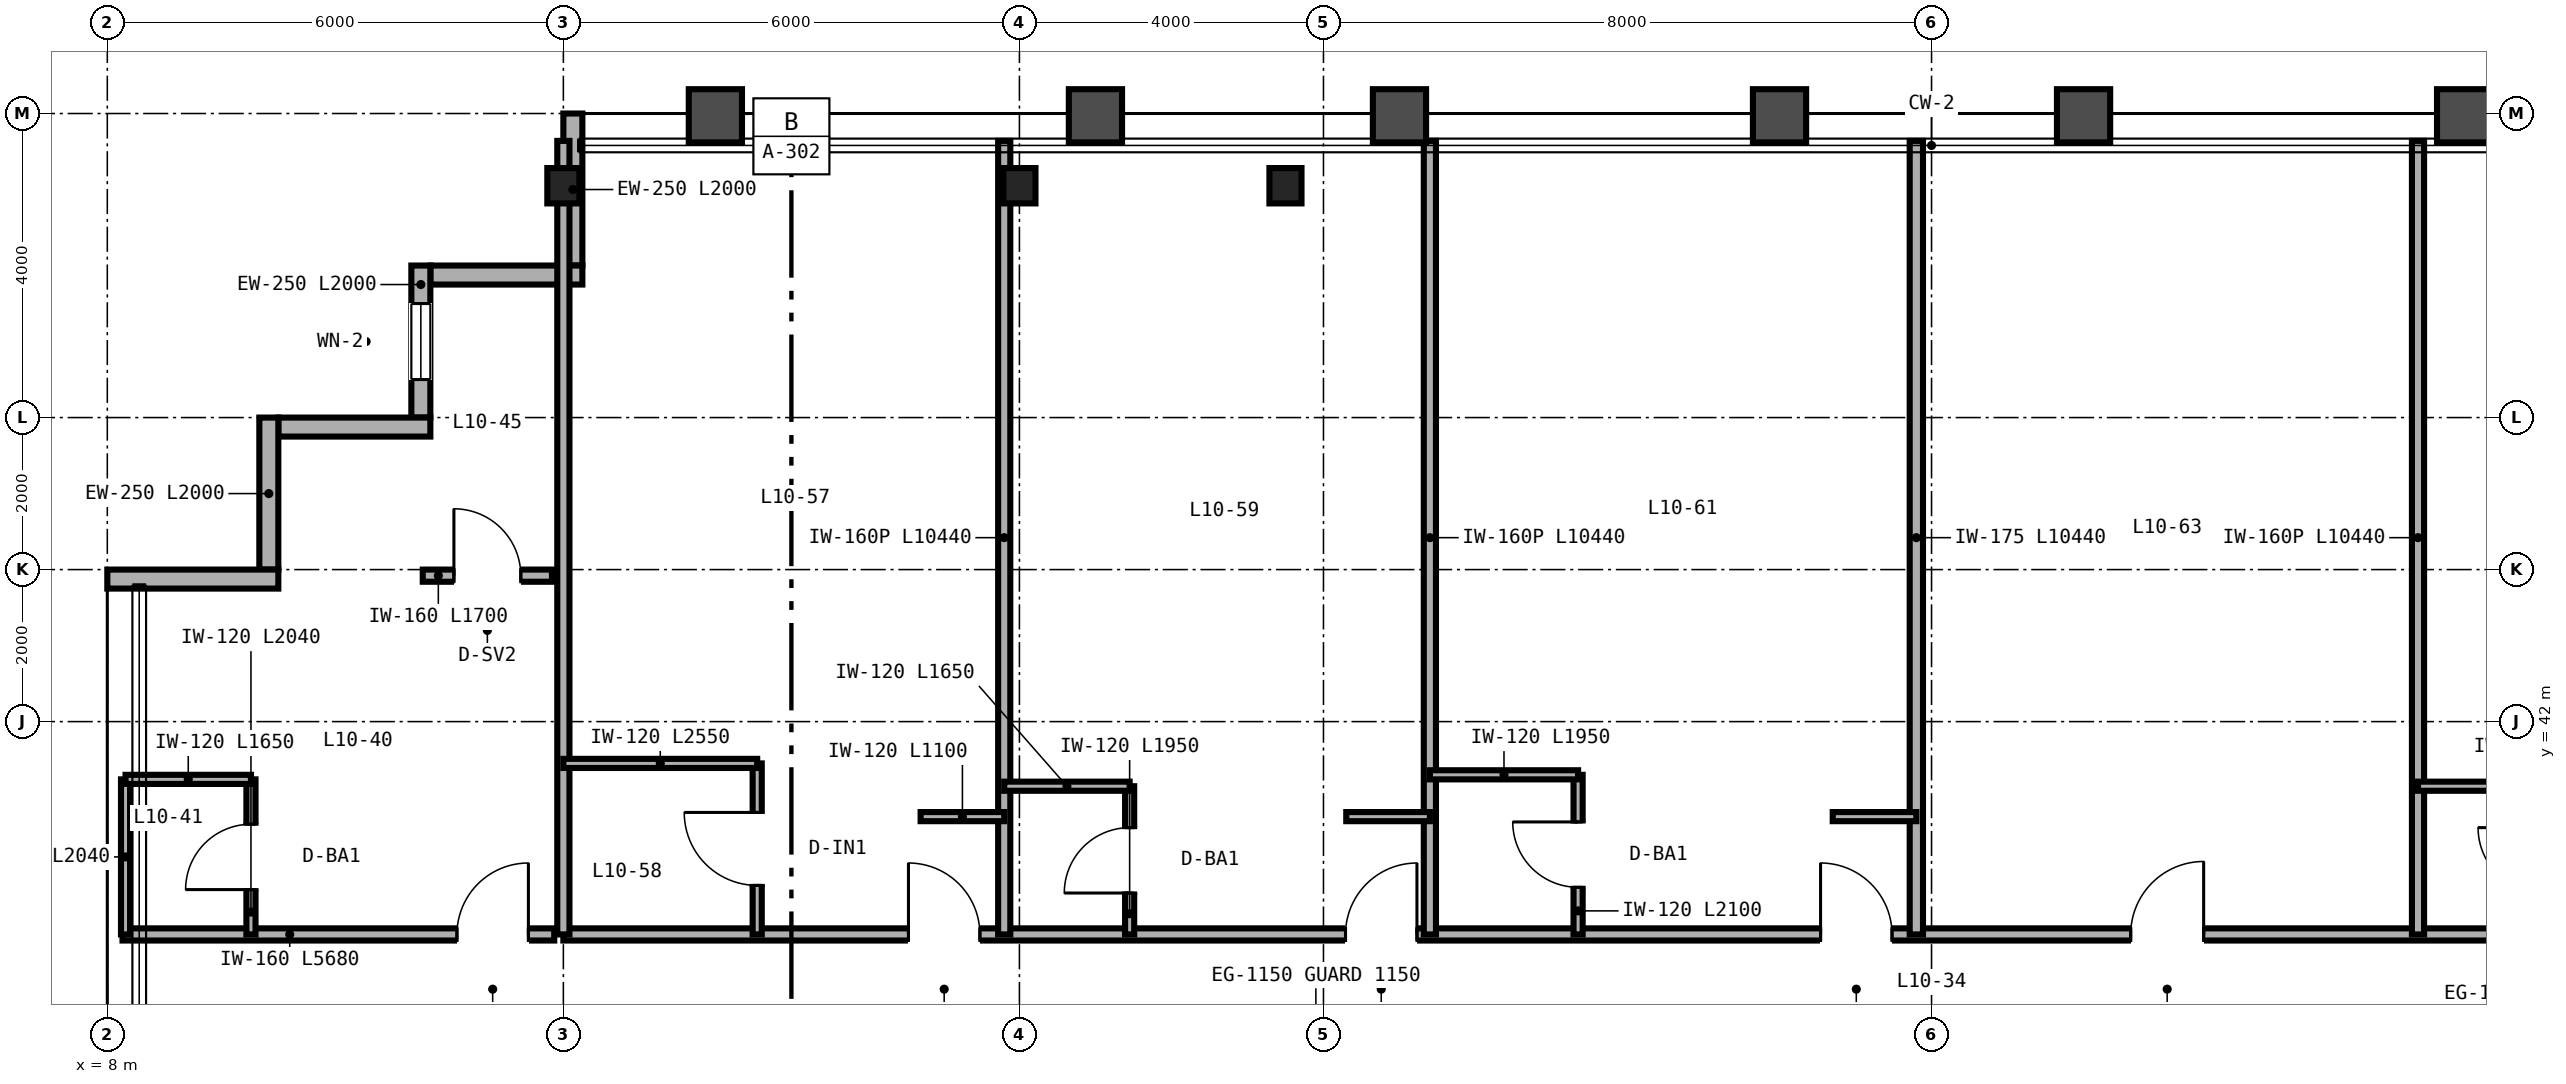
"""IFC4 building model, lengths in metres.
Left out: names, types, materials, properties, quantities, classifications, styles, units other than length and angle.
Written with IfcOpenShell. Run it as: python <this file> out.ifc"""

import sys

from ifc_helpers import new_model, si_unit, direction, frame, frame_2d, origin, origin_2d, place, context, subcontext, project, spatial, rectangle, i_section, extrude, source, transform, mapped, element, fill, save


model = new_model("IFC4")
c1 = context("Model", 3, precision=1e-05, world=origin(), true_north=direction((0.0, 1.0)))
c2 = subcontext(c1, "Body", "Model", "MODEL_VIEW")
j1 = project(units=[si_unit("LENGTHUNIT", "METRE"), si_unit("PLANEANGLEUNIT", "RADIAN")], contexts=[c1])
p1 = place(None, origin())
s1 = spatial("IfcSite", under=j1, at=p1, CompositionType="ELEMENT")
p2 = place(p1, origin())
s2 = spatial("IfcBuilding", under=s1, at=p2, CompositionType="ELEMENT")
p3 = place(p2, frame((0.0, 0.0, 45.6)))
s3 = spatial("IfcBuildingStorey", under=s2, at=p3, CompositionType="ELEMENT", Elevation=45.6)
m1 = source(origin(), c2, "Body", "SweptSolid", [
    extrude(i_section(OverallWidth=0.422, OverallDepth=0.465, WebThickness=0.045, FlangeThickness=0.073, FilletRadius=0.025, at=origin_2d()), origin(), (0.0, 0.0, 1.0), 3.35),
])
for number, where, z_axis, x_axis in (
    (1, (14.0, 49.05, 0.0), (0.0, 0.0, 1.0), (1.0, 0.0, 0.0)),
    (2, (20.0, 49.05, 0.0), (0.0, 0.0, 1.0), (1.0, 0.0, 0.0)),
    (3, (23.5, 49.05, 0.0), (0.0, 0.0, 1.0), (1.0, 0.0, 0.0)),
):
    element("IfcColumn", number, at=place(p3, frame(where, z_axis=z_axis, x_axis=x_axis)), inside=s3, PredefinedType="COLUMN", context=c2, shape_type="MappedRepresentation", body=[
        mapped(m1, transform((0.0, 0.0, 0.0), scale=1.0)),
    ])
p4 = place(p3, frame((14.125, 50.0, 0.0), z_axis=(0.0, 0.0, 1.0), x_axis=(0.0, -1.0, 0.0)))
e4 = element("IfcWall", 4, at=p4, inside=s3, PredefinedType="SOLIDWALL", context=c2, shape_type="SweptSolid", body=[
    extrude(rectangle(XDim=2.0, YDim=0.25, at=frame_2d((1.0, 0.0))), origin(), (0.0, 0.0, 1.0), 2.657),
])
p5 = place(p3, frame((14.25, 47.875, 0.0), z_axis=(0.0, 0.0, 1.0), x_axis=(-1.0, 0.0, 0.0)))
e5 = element("IfcWall", 5, at=p5, inside=s3, PredefinedType="SOLIDWALL", context=c2, shape_type="SweptSolid", body=[
    extrude(rectangle(XDim=2.0, YDim=0.25, at=frame_2d((1.0, 0.0))), origin(), (0.0, 0.0, 1.0), 3.35),
])
p6 = place(p3, frame((12.125, 48.0, 0.0), z_axis=(0.0, 0.0, 1.0), x_axis=(0.0, -1.0, 0.0)))
e6 = element("IfcWall", 6, at=p6, inside=s3, PredefinedType="SOLIDWALL", context=c2, shape_type="SweptSolid", body=[
    extrude(rectangle(XDim=2.0, YDim=0.25, at=frame_2d((1.0, 0.0))), origin(), (0.0, 0.0, 1.0), 3.35),
])
p7 = place(p6, frame((0.5, 0.0, 0.85)))
e7 = element("IfcOpeningElement", 7, at=p7, cuts=e6, PredefinedType="OPENING", context=c2, shape_type="SweptSolid", body=[
    extrude(rectangle(XDim=1.0, YDim=1.9, at=frame_2d((0.5, 0.95))), frame((0.0, 0.135, 0.0), z_axis=(0.0, -1.0, 0.0), x_axis=(1.0, 0.0, 0.0)), (0.0, 0.0, 1.0), 0.27),
])
for number, where, z_axis, x_axis in (
    (8, (12.25, 45.875, 0.0), (0.0, 0.0, 1.0), (-1.0, 0.0, 0.0)),
    (9, (10.125, 46.0, 0.0), (0.0, 0.0, 1.0), (0.0, -1.0, 0.0)),
):
    element("IfcWall", number, at=place(p3, frame(where, z_axis=z_axis, x_axis=x_axis)), inside=s3, PredefinedType="SOLIDWALL", context=c2, shape_type="SweptSolid", body=[
        extrude(rectangle(XDim=2.0, YDim=0.25, at=frame_2d((1.0, 0.0))), origin(), (0.0, 0.0, 1.0), 3.35),
    ])
p8 = place(p3, frame((10.25, 43.875, 0.0), z_axis=(0.0, 0.0, 1.0), x_axis=(-1.0, 0.0, 0.0)))
e10 = element("IfcWall", 10, at=p8, inside=s3, PredefinedType="SOLIDWALL", context=c2, shape_type="SweptSolid", body=[
    extrude(rectangle(XDim=2.25, YDim=0.25, at=frame_2d((1.125, 0.0))), origin(), (0.0, 0.0, 1.0), 3.35),
])
p9 = place(p3, frame((8.2, 39.2, 0.0), z_axis=(0.0, 0.0, 1.0), x_axis=(1.0, 0.0, 0.0)))
e11 = element("IfcWall", 11, at=p9, inside=s3, PredefinedType="PARTITIONING", context=c2, shape_type="SweptSolid", body=[
    extrude(rectangle(XDim=5.68, YDim=0.16, at=frame_2d((2.84, 0.0))), origin(), (0.0, 0.0, 1.0), 3.35),
])
p10 = place(p9, frame((4.4, 0.0, 0.0)))
e12 = element("IfcOpeningElement", 12, at=p10, cuts=e11, PredefinedType="OPENING", context=c2, shape_type="SweptSolid", body=[
    extrude(rectangle(XDim=0.94, YDim=2.15, at=frame_2d((0.47, 1.075))), frame((0.0, 0.09, 0.0), z_axis=(0.0, -1.0, 0.0), x_axis=(1.0, 0.0, 0.0)), (0.0, 0.0, 1.0), 0.18),
])
p11 = place(p3, frame((9.89, 39.2, 0.0), z_axis=(0.0, 0.0, 1.0), x_axis=(0.0, 1.0, 0.0)))
e13 = element("IfcWall", 13, at=p11, inside=s3, PredefinedType="PARTITIONING", context=c2, shape_type="SweptSolid", body=[
    extrude(rectangle(XDim=2.04, YDim=0.12, at=frame_2d((1.02, 0.0))), origin(), (0.0, 0.0, 1.0), 3.35),
])
p12 = place(p11, frame((0.59, 0.0, 0.0)))
e14 = element("IfcOpeningElement", 14, at=p12, cuts=e13, PredefinedType="OPENING", context=c2, shape_type="SweptSolid", body=[
    extrude(rectangle(XDim=0.86, YDim=2.1, at=frame_2d((0.43, 1.05))), frame((0.0, 0.07, 0.0), z_axis=(0.0, -1.0, 0.0), x_axis=(1.0, 0.0, 0.0)), (0.0, 0.0, 1.0), 0.14),
])
p13 = place(p3, frame((8.24, 39.2, 0.0), z_axis=(0.0, 0.0, 1.0), x_axis=(0.0, 1.0, 0.0)))
e15 = element("IfcWall", 15, at=p13, inside=s3, PredefinedType="PARTITIONING", context=c2, shape_type="SweptSolid", body=[
    extrude(rectangle(XDim=2.04, YDim=0.12, at=frame_2d((1.02, 0.0))), origin(), (0.0, 0.0, 1.0), 3.35),
])
p14 = place(p3, frame((8.24, 41.24, 0.0), z_axis=(0.0, 0.0, 1.0), x_axis=(1.0, 0.0, 0.0)))
e16 = element("IfcWall", 16, at=p14, inside=s3, PredefinedType="PARTITIONING", context=c2, shape_type="SweptSolid", body=[
    extrude(rectangle(XDim=1.65, YDim=0.12, at=frame_2d((0.825, 0.0))), origin(), (0.0, 0.0, 1.0), 3.35),
])
p15 = place(p3, frame((12.15, 43.92, 0.0), z_axis=(0.0, 0.0, 1.0), x_axis=(1.0, 0.0, 0.0)))
e17 = element("IfcWall", 17, at=p15, inside=s3, PredefinedType="PARTITIONING", context=c2, shape_type="SweptSolid", body=[
    extrude(rectangle(XDim=1.7, YDim=0.16, at=frame_2d((0.85, 0.0))), origin(), (0.0, 0.0, 1.0), 3.35),
])
p16 = place(p15, frame((0.41, 0.0, 0.0)))
e18 = element("IfcOpeningElement", 18, at=p16, cuts=e17, PredefinedType="OPENING", context=c2, shape_type="SweptSolid", body=[
    extrude(rectangle(XDim=0.88, YDim=2.15, at=frame_2d((0.44, 1.075))), frame((0.0, 0.09, 0.0), z_axis=(0.0, -1.0, 0.0), x_axis=(1.0, 0.0, 0.0)), (0.0, 0.0, 1.0), 0.18),
])
p17 = place(p3, frame((14.0, 39.2, 0.0), z_axis=(0.0, 0.0, 1.0), x_axis=(1.0, 0.0, 0.0)))
e19 = element("IfcWall", 19, at=p17, inside=s3, PredefinedType="PARTITIONING", context=c2, shape_type="SweptSolid", body=[
    extrude(rectangle(XDim=36.0, YDim=0.16, at=frame_2d((18.0, 0.0))), origin(), (0.0, 0.0, 1.0), 2.571),
])
p18 = place(p17, frame((4.54, 0.0, 0.0)))
e20 = element("IfcOpeningElement", 20, at=p18, cuts=e19, PredefinedType="OPENING", context=c2, shape_type="SweptSolid", body=[
    extrude(rectangle(XDim=0.94, YDim=2.15, at=frame_2d((0.47, 1.075))), frame((0.0, 0.09, 0.0), z_axis=(0.0, -1.0, 0.0), x_axis=(1.0, 0.0, 0.0)), (0.0, 0.0, 1.0), 0.18),
])
p19 = place(p17, frame((10.29, 0.0, 0.0)))
e21 = element("IfcOpeningElement", 21, at=p19, cuts=e19, PredefinedType="OPENING", context=c2, shape_type="SweptSolid", body=[
    extrude(rectangle(XDim=0.94, YDim=2.15, at=frame_2d((0.47, 1.075))), frame((0.0, 0.09, 0.0), z_axis=(0.0, -1.0, 0.0), x_axis=(1.0, 0.0, 0.0)), (0.0, 0.0, 1.0), 0.18),
])
p20 = place(p17, frame((16.54, 0.0, 0.0)))
e22 = element("IfcOpeningElement", 22, at=p20, cuts=e19, PredefinedType="OPENING", context=c2, shape_type="SweptSolid", body=[
    extrude(rectangle(XDim=0.94, YDim=2.15, at=frame_2d((0.47, 1.075))), frame((0.0, 0.09, 0.0), z_axis=(0.0, -1.0, 0.0), x_axis=(1.0, 0.0, 0.0)), (0.0, 0.0, 1.0), 0.18),
])
p21 = place(p17, frame((20.62, 0.0, 0.0)))
e23 = element("IfcOpeningElement", 23, at=p21, cuts=e19, PredefinedType="OPENING", context=c2, shape_type="SweptSolid", body=[
    extrude(rectangle(XDim=0.96, YDim=2.15, at=frame_2d((0.48, 1.075))), frame((0.0, 0.09, 0.0), z_axis=(0.0, -1.0, 0.0), x_axis=(1.0, 0.0, 0.0)), (0.0, 0.0, 1.0), 0.18),
])
p22 = place(p17, frame((28.94, 0.0, 0.0)))
e24 = element("IfcOpeningElement", 24, at=p22, cuts=e19, PredefinedType="OPENING", context=c2, shape_type="SweptSolid", body=[
    extrude(rectangle(XDim=0.94, YDim=2.15, at=frame_2d((0.47, 1.075))), frame((0.0, 0.09, 0.0), z_axis=(0.0, -1.0, 0.0), x_axis=(1.0, 0.0, 0.0)), (0.0, 0.0, 1.0), 0.18),
])
p23 = place(p17, frame((34.74, 0.0, 0.0)))
e25 = element("IfcOpeningElement", 25, at=p23, cuts=e19, PredefinedType="OPENING", context=c2, shape_type="SweptSolid", body=[
    extrude(rectangle(XDim=0.94, YDim=2.15, at=frame_2d((0.47, 1.075))), frame((0.0, 0.09, 0.0), z_axis=(0.0, -1.0, 0.0), x_axis=(1.0, 0.0, 0.0)), (0.0, 0.0, 1.0), 0.18),
])
for number, where, z_axis, x_axis in (
    (26, (14.0, 39.2, 0.0), (0.0, 0.0, 1.0), (0.0, 1.0, 0.0)),
    (27, (19.8, 39.2, 0.0), (0.0, 0.0, 1.0), (0.0, 1.0, 0.0)),
):
    element("IfcWall", number, at=place(p3, frame(where, z_axis=z_axis, x_axis=x_axis)), inside=s3, PredefinedType="PARTITIONING", context=c2, shape_type="SweptSolid", body=[
        extrude(rectangle(XDim=10.44, YDim=0.16, at=frame_2d((5.22, 0.0))), origin(), (0.0, 0.0, 1.0), 2.657),
    ])
p24 = place(p3, frame((16.55, 39.2, 0.0), z_axis=(0.0, 0.0, 1.0), x_axis=(0.0, 1.0, 0.0)))
e28 = element("IfcWall", 28, at=p24, inside=s3, PredefinedType="PARTITIONING", context=c2, shape_type="SweptSolid", body=[
    extrude(rectangle(XDim=2.25, YDim=0.12, at=frame_2d((1.125, 0.0))), origin(), (0.0, 0.0, 1.0), 3.35),
])
p25 = place(p24, frame((0.645, 0.0, 0.0)))
e29 = element("IfcOpeningElement", 29, at=p25, cuts=e28, PredefinedType="OPENING", context=c2, shape_type="SweptSolid", body=[
    extrude(rectangle(XDim=0.96, YDim=2.15, at=frame_2d((0.48, 1.075))), frame((0.0, 0.07, 0.0), z_axis=(0.0, -1.0, 0.0), x_axis=(1.0, 0.0, 0.0)), (0.0, 0.0, 1.0), 0.14),
])
p26 = place(p3, frame((14.0, 41.45, 0.0), z_axis=(0.0, 0.0, 1.0), x_axis=(1.0, 0.0, 0.0)))
e30 = element("IfcWall", 30, at=p26, inside=s3, PredefinedType="PARTITIONING", context=c2, shape_type="SweptSolid", body=[
    extrude(rectangle(XDim=2.55, YDim=0.12, at=frame_2d((1.275, 0.0))), origin(), (0.0, 0.0, 1.0), 3.35),
])
p27 = place(p3, frame((18.7, 40.75, 0.0), z_axis=(0.0, 0.0, 1.0), x_axis=(1.0, 0.0, 0.0)))
e31 = element("IfcWall", 31, at=p27, inside=s3, PredefinedType="PARTITIONING", context=c2, shape_type="SweptSolid", body=[
    extrude(rectangle(XDim=1.1, YDim=0.12, at=frame_2d((0.55, 0.0))), origin(), (0.0, 0.0, 1.0), 3.35),
])
p28 = place(p3, frame((25.4, 39.2, 0.0), z_axis=(0.0, 0.0, 1.0), x_axis=(0.0, 1.0, 0.0)))
e32 = element("IfcWall", 32, at=p28, inside=s3, PredefinedType="PARTITIONING", context=c2, shape_type="SweptSolid", body=[
    extrude(rectangle(XDim=10.44, YDim=0.16, at=frame_2d((5.22, 0.0))), origin(), (0.0, 0.0, 1.0), 2.423),
])
p29 = place(p3, frame((21.45, 39.2, 0.0), z_axis=(0.0, 0.0, 1.0), x_axis=(0.0, 1.0, 0.0)))
e33 = element("IfcWall", 33, at=p29, inside=s3, PredefinedType="PARTITIONING", context=c2, shape_type="SweptSolid", body=[
    extrude(rectangle(XDim=1.95, YDim=0.12, at=frame_2d((0.975, 0.0))), origin(), (0.0, 0.0, 1.0), 3.35),
])
p30 = place(p29, frame((0.545, 0.0, 0.0)))
e34 = element("IfcOpeningElement", 34, at=p30, cuts=e33, PredefinedType="OPENING", context=c2, shape_type="SweptSolid", body=[
    extrude(rectangle(XDim=0.86, YDim=2.1, at=frame_2d((0.43, 1.05))), frame((0.0, 0.07, 0.0), z_axis=(0.0, -1.0, 0.0), x_axis=(1.0, 0.0, 0.0)), (0.0, 0.0, 1.0), 0.14),
])
p31 = place(p3, frame((19.8, 41.15, 0.0), z_axis=(0.0, 0.0, 1.0), x_axis=(1.0, 0.0, 0.0)))
e35 = element("IfcWall", 35, at=p31, inside=s3, PredefinedType="PARTITIONING", context=c2, shape_type="SweptSolid", body=[
    extrude(rectangle(XDim=1.65, YDim=0.12, at=frame_2d((0.825, 0.0))), origin(), (0.0, 0.0, 1.0), 3.35),
])
p32 = place(p3, frame((24.3, 40.75, 0.0), z_axis=(0.0, 0.0, 1.0), x_axis=(1.0, 0.0, 0.0)))
e36 = element("IfcWall", 36, at=p32, inside=s3, PredefinedType="PARTITIONING", context=c2, shape_type="SweptSolid", body=[
    extrude(rectangle(XDim=1.1, YDim=0.12, at=frame_2d((0.55, 0.0))), origin(), (0.0, 0.0, 1.0), 3.35),
])
p33 = place(p3, frame((31.8, 39.2, 0.0), z_axis=(0.0, 0.0, 1.0), x_axis=(0.0, 1.0, 0.0)))
e37 = element("IfcWall", 37, at=p33, inside=s3, PredefinedType="PARTITIONING", context=c2, shape_type="SweptSolid", body=[
    extrude(rectangle(XDim=10.44, YDim=0.175, at=frame_2d((5.22, 0.0))), origin(), (0.0, 0.0, 1.0), 2.423),
])
p34 = place(p3, frame((27.35, 39.2, 0.0), z_axis=(0.0, 0.0, 1.0), x_axis=(0.0, 1.0, 0.0)))
e38 = element("IfcWall", 38, at=p34, inside=s3, PredefinedType="PARTITIONING", context=c2, shape_type="SweptSolid", body=[
    extrude(rectangle(XDim=2.1, YDim=0.12, at=frame_2d((1.05, 0.0))), origin(), (0.0, 0.0, 1.0), 3.35),
])
p35 = place(p34, frame((0.62, 0.0, 0.0)))
e39 = element("IfcOpeningElement", 39, at=p35, cuts=e38, PredefinedType="OPENING", context=c2, shape_type="SweptSolid", body=[
    extrude(rectangle(XDim=0.86, YDim=2.1, at=frame_2d((0.43, 1.05))), frame((0.0, 0.07, 0.0), z_axis=(0.0, -1.0, 0.0), x_axis=(1.0, 0.0, 0.0)), (0.0, 0.0, 1.0), 0.14),
])
p36 = place(p3, frame((25.4, 41.3, 0.0), z_axis=(0.0, 0.0, 1.0), x_axis=(1.0, 0.0, 0.0)))
e40 = element("IfcWall", 40, at=p36, inside=s3, PredefinedType="PARTITIONING", context=c2, shape_type="SweptSolid", body=[
    extrude(rectangle(XDim=1.95, YDim=0.12, at=frame_2d((0.975, 0.0))), origin(), (0.0, 0.0, 1.0), 3.35),
])
p37 = place(p3, frame((30.7, 40.75, 0.0), z_axis=(0.0, 0.0, 1.0), x_axis=(1.0, 0.0, 0.0)))
e41 = element("IfcWall", 41, at=p37, inside=s3, PredefinedType="PARTITIONING", context=c2, shape_type="SweptSolid", body=[
    extrude(rectangle(XDim=1.1, YDim=0.12, at=frame_2d((0.55, 0.0))), origin(), (0.0, 0.0, 1.0), 3.35),
])
p38 = place(p3, frame((38.4, 39.2, 0.0), z_axis=(0.0, 0.0, 1.0), x_axis=(0.0, 1.0, 0.0)))
e42 = element("IfcWall", 42, at=p38, inside=s3, PredefinedType="PARTITIONING", context=c2, shape_type="SweptSolid", body=[
    extrude(rectangle(XDim=10.44, YDim=0.16, at=frame_2d((5.22, 0.0))), origin(), (0.0, 0.0, 1.0), 2.423),
])
p39 = place(p3, frame((38.4, 41.15, 0.0), z_axis=(0.0, 0.0, 1.0), x_axis=(1.0, 0.0, 0.0)))
e43 = element("IfcWall", 43, at=p39, inside=s3, PredefinedType="PARTITIONING", context=c2, shape_type="SweptSolid", body=[
    extrude(rectangle(XDim=1.65, YDim=0.12, at=frame_2d((0.825, 0.0))), origin(), (0.0, 0.0, 1.0), 3.35),
])
m2 = source(origin(), c2, "Body", "SweptSolid", [
    extrude(rectangle(XDim=1.0, YDim=1.9, at=frame_2d((0.5, 0.95))), frame((0.0, 0.03, 0.0), z_axis=(0.0, -1.0, 0.0), x_axis=(1.0, 0.0, 0.0)), (0.0, 0.0, 1.0), 0.06),
])
p40 = place(p7, origin())
e44 = element("IfcWindow", 44, at=p40, inside=s3, PartitioningType="SINGLE_PANEL", PredefinedType="WINDOW", context=c2, shape_type="MappedRepresentation", body=[
    mapped(m2, transform((0.0, 0.0, 0.0), scale=1.0)),
])
fill(e7, e44)
m3 = source(origin(), c2, "Body", "SweptSolid", [
    extrude(rectangle(XDim=0.86, YDim=2.1, at=frame_2d((0.43, 1.05))), frame((0.0, 0.025, 0.0), z_axis=(0.0, -1.0, 0.0), x_axis=(1.0, 0.0, 0.0)), (0.0, 0.0, 1.0), 0.05),
])
p41 = place(p12, origin())
e45 = element("IfcDoor", 45, at=p41, inside=s3, OperationType="SINGLE_SWING_LEFT", PredefinedType="DOOR", context=c2, shape_type="MappedRepresentation", body=[
    mapped(m3, transform((0.0, 0.0, 0.0), scale=1.0)),
])
fill(e14, e45)
m4 = source(origin(), c2, "Body", "SweptSolid", [
    extrude(rectangle(XDim=0.94, YDim=2.15, at=frame_2d((0.47, 1.075))), frame((0.0, 0.025, 0.0), z_axis=(0.0, -1.0, 0.0), x_axis=(1.0, 0.0, 0.0)), (0.0, 0.0, 1.0), 0.05),
])
p42 = place(p10, origin())
e46 = element("IfcDoor", 46, at=p42, inside=s3, OperationType="SINGLE_SWING_RIGHT", PredefinedType="DOOR", context=c2, shape_type="MappedRepresentation", body=[
    mapped(m4, transform((0.0, 0.0, 0.0), scale=1.0)),
])
fill(e12, e46)
m5 = source(origin(), c2, "Body", "SweptSolid", [
    extrude(rectangle(XDim=0.88, YDim=2.15, at=frame_2d((0.44, 1.075))), frame((0.0, 0.025, 0.0), z_axis=(0.0, -1.0, 0.0), x_axis=(1.0, 0.0, 0.0)), (0.0, 0.0, 1.0), 0.05),
])
p43 = place(p16, origin())
e47 = element("IfcDoor", 47, at=p43, inside=s3, OperationType="SINGLE_SWING_LEFT", PredefinedType="DOOR", context=c2, shape_type="MappedRepresentation", body=[
    mapped(m5, transform((0.0, 0.0, 0.0), scale=1.0)),
])
fill(e18, e47)
m6 = source(origin(), c2, "Body", "SweptSolid", [
    extrude(rectangle(XDim=0.96, YDim=2.15, at=frame_2d((0.48, 1.075))), frame((0.0, 0.025, 0.0), z_axis=(0.0, -1.0, 0.0), x_axis=(1.0, 0.0, 0.0)), (0.0, 0.0, 1.0), 0.05),
])
p44 = place(p25, origin())
e48 = element("IfcDoor", 48, at=p44, inside=s3, OperationType="SINGLE_SWING_RIGHT", PredefinedType="DOOR", context=c2, shape_type="MappedRepresentation", body=[
    mapped(m6, transform((0.0, 0.0, 0.0), scale=1.0)),
])
fill(e29, e48)
p45 = place(p30, origin())
e49 = element("IfcDoor", 49, at=p45, inside=s3, OperationType="SINGLE_SWING_LEFT", PredefinedType="DOOR", context=c2, shape_type="MappedRepresentation", body=[
    mapped(m3, transform((0.0, 0.0, 0.0), scale=1.0)),
])
fill(e34, e49)
p46 = place(p35, origin())
e50 = element("IfcDoor", 50, at=p46, inside=s3, OperationType="SINGLE_SWING_RIGHT", PredefinedType="DOOR", context=c2, shape_type="MappedRepresentation", body=[
    mapped(m3, transform((0.0, 0.0, 0.0), scale=1.0)),
])
fill(e39, e50)
p47 = place(p18, origin())
e51 = element("IfcDoor", 51, at=p47, inside=s3, OperationType="SINGLE_SWING_LEFT", PredefinedType="DOOR", context=c2, shape_type="MappedRepresentation", body=[
    mapped(m4, transform((0.0, 0.0, 0.0), scale=1.0)),
])
fill(e20, e51)
p48 = place(p19, origin())
e52 = element("IfcDoor", 52, at=p48, inside=s3, OperationType="SINGLE_SWING_RIGHT", PredefinedType="DOOR", context=c2, shape_type="MappedRepresentation", body=[
    mapped(m4, transform((0.0, 0.0, 0.0), scale=1.0)),
])
fill(e21, e52)
p49 = place(p20, origin())
e53 = element("IfcDoor", 53, at=p49, inside=s3, OperationType="SINGLE_SWING_LEFT", PredefinedType="DOOR", context=c2, shape_type="MappedRepresentation", body=[
    mapped(m4, transform((0.0, 0.0, 0.0), scale=1.0)),
])
fill(e22, e53)
p50 = place(p21, origin())
e54 = element("IfcDoor", 54, at=p50, inside=s3, OperationType="SINGLE_SWING_RIGHT", PredefinedType="DOOR", context=c2, shape_type="MappedRepresentation", body=[
    mapped(m6, transform((0.0, 0.0, 0.0), scale=1.0)),
])
fill(e23, e54)
save(model, sys.argv[1])
